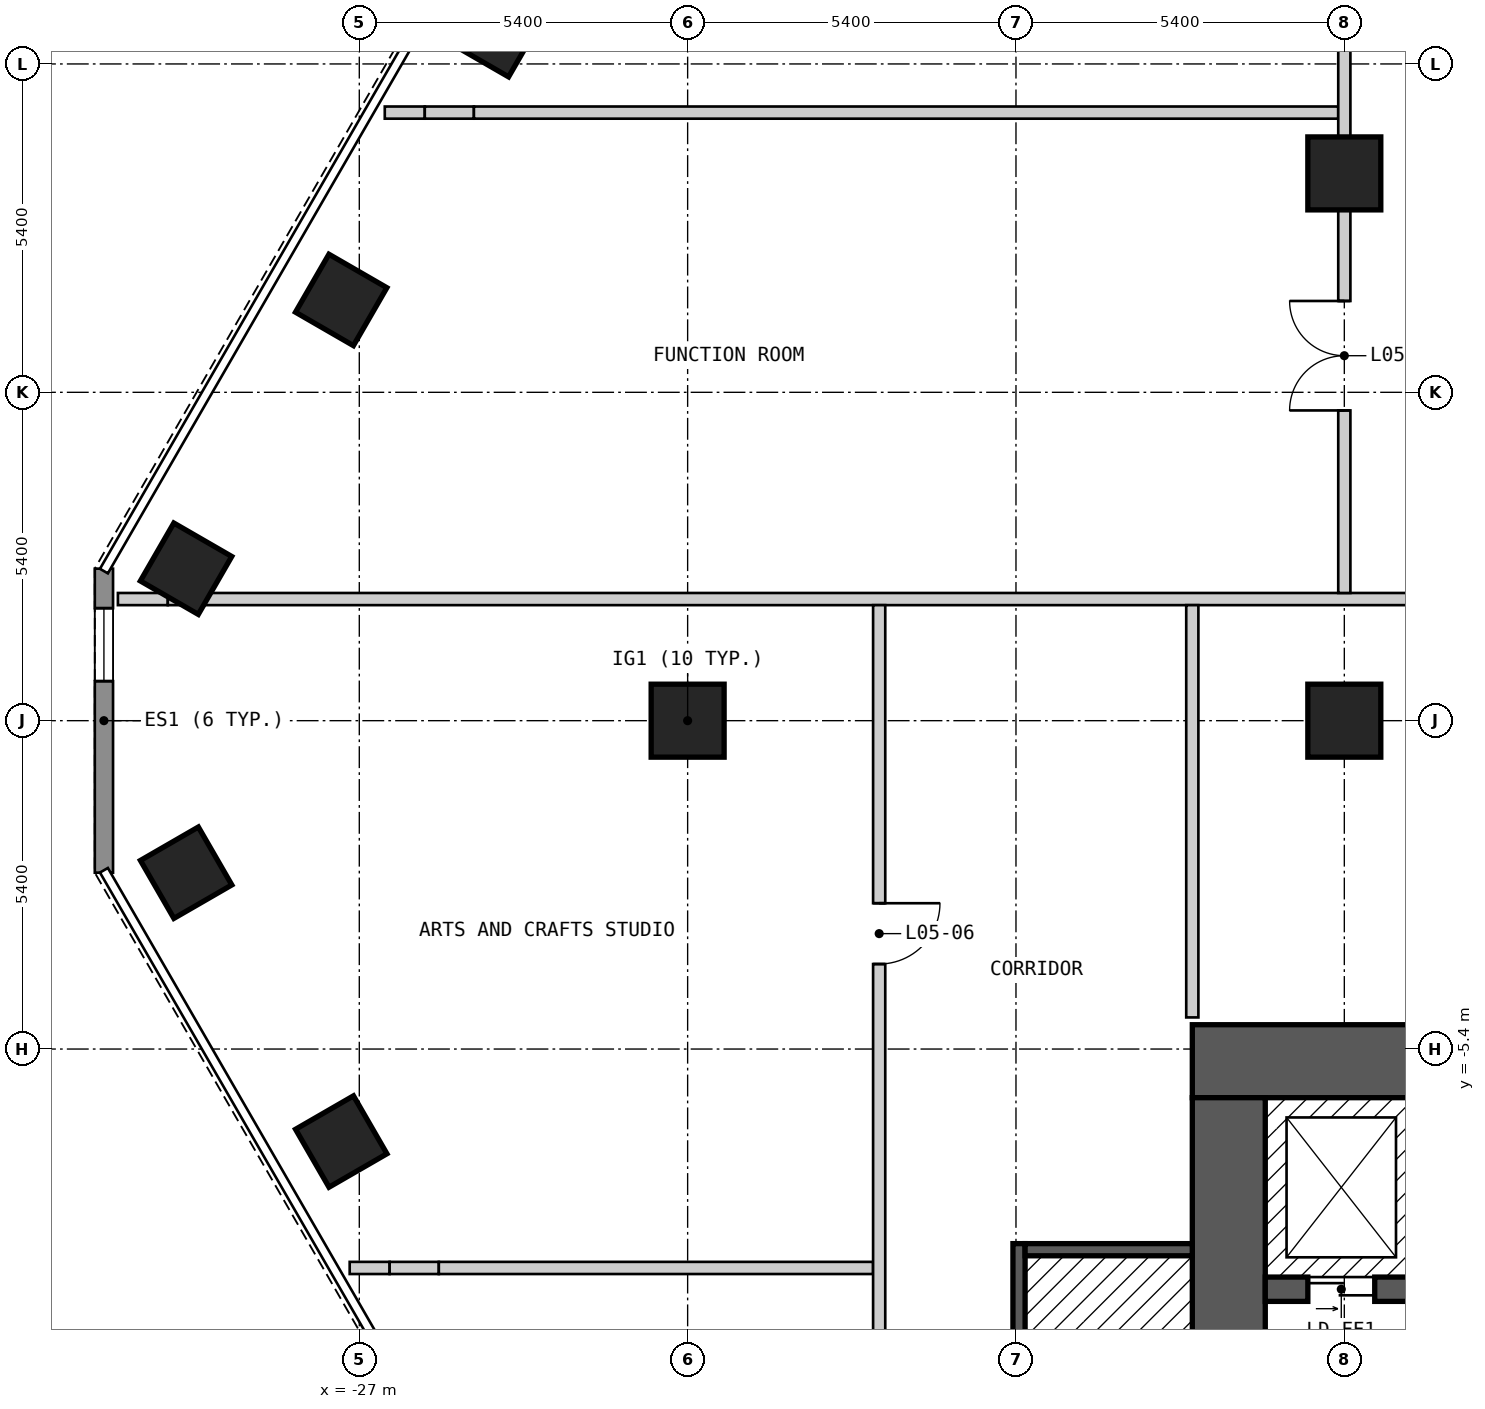
"""IFC4 building model, lengths in metres.
Left out: names, types, materials, properties, quantities, classifications, styles, units other than length and angle.
Written with IfcOpenShell. Run it as: python <this file> out.ifc"""

import sys

from ifc_helpers import new_model, si_unit, direction, frame, frame_2d, origin, origin_2d, place, context, subcontext, project, spatial, polyline, rectangle, outline, extrude, element, fill, save


model = new_model("IFC4")
c1 = context("Model", 3, precision=1e-05, world=origin(), true_north=direction((0.0, 1.0)))
c2 = subcontext(c1, "Body", "Model", "MODEL_VIEW")
j1 = project(units=[si_unit("LENGTHUNIT", "METRE"), si_unit("PLANEANGLEUNIT", "RADIAN")], contexts=[c1])
p1 = place(None, origin())
s1 = spatial("IfcSite", under=j1, at=p1, CompositionType="ELEMENT")
p2 = place(p1, origin())
s2 = spatial("IfcBuilding", under=s1, at=p2, CompositionType="ELEMENT")
p3 = place(p2, frame((0.0, 0.0, 19.8)))
s3 = spatial("IfcBuildingStorey", under=s2, at=p3, CompositionType="ELEMENT", Elevation=19.8)
for number, where, z_axis, x_axis in (
    (1, (-24.746, 11.339, 0.0), (0.0, 0.0, 1.0), (-0.5, -0.866, 0.0)),
    (2, (-27.298, 6.919, 0.0), (0.0, 0.0, 1.0), (-0.5, -0.866, 0.0)),
    (3, (-29.849, 2.499, 0.0), (0.0, 0.0, 1.0), (-0.5, -0.866, 0.0)),
    (4, (-29.848, -2.5, 0.0), (0.0, 0.0, 1.0), (0.5, -0.866, 0.0)),
    (5, (-27.297, -6.921, 0.0), (0.0, 0.0, 1.0), (0.5, -0.866, 0.0)),
):
    element("IfcColumn", number, at=place(p3, frame(where, z_axis=z_axis, x_axis=x_axis)), inside=s3, PredefinedType="COLUMN", context=c2, shape_type="SweptSolid", body=[
        extrude(rectangle(XDim=1.1, YDim=1.1, at=origin_2d()), origin(), (0.0, 0.0, 1.0), 3.6),
    ])
for number, where, z_axis, x_axis in (
    (6, (-21.6, 0.0, 0.0), (0.0, 0.0, 1.0), (1.0, 0.0, 0.0)),
    (7, (-10.8, 0.0, 0.0), (0.0, 0.0, 1.0), (1.0, 0.0, 0.0)),
    (8, (-10.8, 9.0, 0.0), (0.0, 0.0, 1.0), (1.0, 0.0, 0.0)),
):
    element("IfcColumn", number, at=place(p3, frame(where, z_axis=z_axis, x_axis=x_axis)), inside=s3, PredefinedType="COLUMN", context=c2, shape_type="SweptSolid", body=[
        extrude(rectangle(XDim=1.2, YDim=1.2, at=origin_2d()), origin(), (0.0, 0.0, 1.0), 3.6),
    ])
p4 = place(p3, frame((-13.3, -5.6, 0.0), z_axis=(0.0, 0.0, 1.0), x_axis=(1.0, 0.0, 0.0)))
e9 = element("IfcWall", 9, at=p4, inside=s3, PredefinedType="SHEAR", context=c2, shape_type="SweptSolid", body=[
    extrude(rectangle(XDim=26.6, YDim=1.2, at=frame_2d((13.3, 0.0))), origin(), (0.0, 0.0, 1.0), 2.8),
])
p5 = place(p4, frame((23.65, 0.0, 0.0)))
e10 = element("IfcOpeningElement", 10, at=p5, cuts=e9, PredefinedType="OPENING", context=c2, shape_type="SweptSolid", body=[
    extrude(rectangle(XDim=1.2, YDim=2.1, at=frame_2d((0.6, 1.05))), frame((0.0, 0.61, 0.0), z_axis=(0.0, -1.0, 0.0), x_axis=(1.0, 0.0, 0.0)), (0.0, 0.0, 1.0), 1.22),
])
p6 = place(p3, frame((-12.7, -17.8, 0.0), z_axis=(0.0, 0.0, 1.0), x_axis=(0.0, 1.0, 0.0)))
e11 = element("IfcWall", 11, at=p6, inside=s3, PredefinedType="SHEAR", context=c2, shape_type="SweptSolid", body=[
    extrude(rectangle(XDim=11.6, YDim=1.2, at=frame_2d((5.8, 0.0))), origin(), (0.0, 0.0, 1.0), 2.8),
])
p7 = place(p6, frame((3.6, 0.0, 0.0)))
e12 = element("IfcOpeningElement", 12, at=p7, cuts=e11, PredefinedType="OPENING", context=c2, shape_type="SweptSolid", body=[
    extrude(rectangle(XDim=1.2, YDim=2.1, at=frame_2d((0.6, 1.05))), frame((0.0, 0.61, 0.0), z_axis=(0.0, -1.0, 0.0), x_axis=(1.0, 0.0, 0.0)), (0.0, 0.0, 1.0), 1.22),
])
p8 = place(p3, frame((-12.1, -9.35, 0.0), z_axis=(0.0, 0.0, 1.0), x_axis=(1.0, 0.0, 0.0)))
e13 = element("IfcWall", 13, at=p8, inside=s3, PredefinedType="SHEAR", context=c2, shape_type="SweptSolid", body=[
    extrude(rectangle(XDim=22.3, YDim=0.4, at=frame_2d((11.15, 0.0))), origin(), (0.0, 0.0, 1.0), 2.8),
])
p9 = place(p8, frame((0.7, 0.0, 0.0)))
e14 = element("IfcOpeningElement", 14, at=p9, cuts=e13, PredefinedType="OPENING", context=c2, shape_type="SweptSolid", body=[
    extrude(rectangle(XDim=1.1, YDim=2.1, at=frame_2d((0.55, 1.05))), frame((0.0, 0.21, 0.0), z_axis=(0.0, -1.0, 0.0), x_axis=(1.0, 0.0, 0.0)), (0.0, 0.0, 1.0), 0.42),
])
p10 = place(p8, frame((3.5, 0.0, 0.0)))
e15 = element("IfcOpeningElement", 15, at=p10, cuts=e13, PredefinedType="OPENING", context=c2, shape_type="SweptSolid", body=[
    extrude(rectangle(XDim=1.1, YDim=2.1, at=frame_2d((0.55, 1.05))), frame((0.0, 0.21, 0.0), z_axis=(0.0, -1.0, 0.0), x_axis=(1.0, 0.0, 0.0)), (0.0, 0.0, 1.0), 0.42),
])
p11 = place(p8, frame((6.3, 0.0, 0.0)))
e16 = element("IfcOpeningElement", 16, at=p11, cuts=e13, PredefinedType="OPENING", context=c2, shape_type="SweptSolid", body=[
    extrude(rectangle(XDim=1.1, YDim=2.1, at=frame_2d((0.55, 1.05))), frame((0.0, 0.21, 0.0), z_axis=(0.0, -1.0, 0.0), x_axis=(1.0, 0.0, 0.0)), (0.0, 0.0, 1.0), 0.42),
])
p12 = place(p8, frame((8.6, 0.0, 0.0)))
e17 = element("IfcOpeningElement", 17, at=p12, cuts=e13, PredefinedType="OPENING", context=c2, shape_type="SweptSolid", body=[
    extrude(rectangle(XDim=1.1, YDim=2.1, at=frame_2d((0.55, 1.05))), frame((0.0, 0.21, 0.0), z_axis=(0.0, -1.0, 0.0), x_axis=(1.0, 0.0, 0.0)), (0.0, 0.0, 1.0), 0.42),
])
p13 = place(p8, frame((10.9, 0.0, 0.0)))
e18 = element("IfcOpeningElement", 18, at=p13, cuts=e13, PredefinedType="OPENING", context=c2, shape_type="SweptSolid", body=[
    extrude(rectangle(XDim=1.1, YDim=2.1, at=frame_2d((0.55, 1.05))), frame((0.0, 0.21, 0.0), z_axis=(0.0, -1.0, 0.0), x_axis=(1.0, 0.0, 0.0)), (0.0, 0.0, 1.0), 0.42),
])
p14 = place(p8, frame((13.2, 0.0, 0.0)))
e19 = element("IfcOpeningElement", 19, at=p14, cuts=e13, PredefinedType="OPENING", context=c2, shape_type="SweptSolid", body=[
    extrude(rectangle(XDim=1.1, YDim=2.1, at=frame_2d((0.55, 1.05))), frame((0.0, 0.21, 0.0), z_axis=(0.0, -1.0, 0.0), x_axis=(1.0, 0.0, 0.0)), (0.0, 0.0, 1.0), 0.42),
])
p15 = place(p8, frame((15.5, 0.0, 0.0)))
e20 = element("IfcOpeningElement", 20, at=p15, cuts=e13, PredefinedType="OPENING", context=c2, shape_type="SweptSolid", body=[
    extrude(rectangle(XDim=1.1, YDim=2.1, at=frame_2d((0.55, 1.05))), frame((0.0, 0.21, 0.0), z_axis=(0.0, -1.0, 0.0), x_axis=(1.0, 0.0, 0.0)), (0.0, 0.0, 1.0), 0.42),
])
p16 = place(p8, frame((17.8, 0.0, 0.0)))
e21 = element("IfcOpeningElement", 21, at=p16, cuts=e13, PredefinedType="OPENING", context=c2, shape_type="SweptSolid", body=[
    extrude(rectangle(XDim=1.1, YDim=2.1, at=frame_2d((0.55, 1.05))), frame((0.0, 0.21, 0.0), z_axis=(0.0, -1.0, 0.0), x_axis=(1.0, 0.0, 0.0)), (0.0, 0.0, 1.0), 0.42),
])
p17 = place(p8, frame((20.2, 0.0, 0.0)))
e22 = element("IfcOpeningElement", 22, at=p17, cuts=e13, PredefinedType="OPENING", context=c2, shape_type="SweptSolid", body=[
    extrude(rectangle(XDim=1.1, YDim=2.1, at=frame_2d((0.55, 1.05))), frame((0.0, 0.21, 0.0), z_axis=(0.0, -1.0, 0.0), x_axis=(1.0, 0.0, 0.0)), (0.0, 0.0, 1.0), 0.42),
])
p18 = place(p3, frame((-31.2, 2.5, 0.0), z_axis=(0.0, 0.0, 1.0), x_axis=(0.0, -1.0, 0.0)))
e23 = element("IfcWall", 23, at=p18, inside=s3, PredefinedType="SOLIDWALL", context=c2, shape_type="SweptSolid", body=[
    extrude(outline(polyline([(0.0, -0.15), (5.0, -0.15), (4.92, 0.15), (0.08, 0.15), (0.0, -0.15)])), origin(), (0.0, 0.0, 1.0), 2.8),
])
p19 = place(p18, frame((0.65, 0.0, 0.15)))
e24 = element("IfcOpeningElement", 24, at=p19, cuts=e23, PredefinedType="OPENING", context=c2, shape_type="SweptSolid", body=[
    extrude(rectangle(XDim=1.2, YDim=2.1, at=frame_2d((0.6, 1.05))), frame((0.0, 0.16, 0.0), z_axis=(0.0, -1.0, 0.0), x_axis=(1.0, 0.0, 0.0)), (0.0, 0.0, 1.0), 0.32),
])
p20 = place(p3, frame((-27.158, -9.0, 0.0), z_axis=(0.0, 0.0, 1.0), x_axis=(1.0, 0.0, 0.0)))
e25 = element("IfcWall", 25, at=p20, inside=s3, PredefinedType="PARTITIONING", context=c2, shape_type="SweptSolid", body=[
    extrude(rectangle(XDim=0.657, YDim=0.2, at=frame_2d((0.329, 0.0))), origin(), (0.0, 0.0, 1.0), 2.8),
])
p21 = place(p3, frame((-26.501, -9.0, 0.0), z_axis=(0.0, 0.0, 1.0), x_axis=(1.0, 0.0, 0.0)))
e26 = element("IfcWall", 26, at=p21, inside=s3, PredefinedType="PARTITIONING", context=c2, shape_type="SweptSolid", body=[
    extrude(rectangle(XDim=0.809, YDim=0.2, at=frame_2d((0.405, 0.0))), origin(), (0.0, 0.0, 1.0), 2.07),
])
p22 = place(p3, frame((-25.692, -9.0, 0.0), z_axis=(0.0, 0.0, 1.0), x_axis=(1.0, 0.0, 0.0)))
e27 = element("IfcWall", 27, at=p22, inside=s3, PredefinedType="PARTITIONING", context=c2, shape_type="SweptSolid", body=[
    extrude(rectangle(XDim=7.142, YDim=0.2, at=frame_2d((3.571, 0.0))), origin(), (0.0, 0.0, 1.0), 2.8),
])
p23 = place(p3, frame((-30.97, 2.0, 0.0), z_axis=(0.0, 0.0, 1.0), x_axis=(1.0, 0.0, 0.0)))
e28 = element("IfcWall", 28, at=p23, inside=s3, PredefinedType="PARTITIONING", context=c2, shape_type="SweptSolid", body=[
    extrude(rectangle(XDim=0.821, YDim=0.2, at=frame_2d((0.411, 0.0))), origin(), (0.0, 0.0, 1.0), 2.8),
])
p24 = place(p3, frame((-30.149, 2.0, 0.0), z_axis=(0.0, 0.0, 1.0), x_axis=(1.0, 0.0, 0.0)))
e29 = element("IfcWall", 29, at=p24, inside=s3, PredefinedType="PARTITIONING", context=c2, shape_type="SweptSolid", body=[
    extrude(rectangle(XDim=0.6, YDim=0.2, at=frame_2d((0.3, 0.0))), origin(), (0.0, 0.0, 1.0), 2.07),
])
p25 = place(p3, frame((-29.549, 2.0, 0.0), z_axis=(0.0, 0.0, 1.0), x_axis=(1.0, 0.0, 0.0)))
e30 = element("IfcWall", 30, at=p25, inside=s3, PredefinedType="PARTITIONING", context=c2, shape_type="SweptSolid", body=[
    extrude(rectangle(XDim=59.097, YDim=0.2, at=frame_2d((29.549, 0.0))), origin(), (0.0, 0.0, 1.0), 2.8),
])
p26 = place(p25, frame((21.517, 0.0, 0.0)))
e31 = element("IfcOpeningElement", 31, at=p26, cuts=e30, PredefinedType="OPENING", context=c2, shape_type="SweptSolid", body=[
    extrude(rectangle(XDim=1.8, YDim=2.1, at=frame_2d((0.9, 1.05))), frame((0.0, 0.11, 0.0), z_axis=(0.0, -1.0, 0.0), x_axis=(1.0, 0.0, 0.0)), (0.0, 0.0, 1.0), 0.22),
])
p27 = place(p25, frame((35.781, 0.0, 0.0)))
e32 = element("IfcOpeningElement", 32, at=p27, cuts=e30, PredefinedType="OPENING", context=c2, shape_type="SweptSolid", body=[
    extrude(rectangle(XDim=1.8, YDim=2.1, at=frame_2d((0.9, 1.05))), frame((0.0, 0.11, 0.0), z_axis=(0.0, -1.0, 0.0), x_axis=(1.0, 0.0, 0.0)), (0.0, 0.0, 1.0), 0.22),
])
p28 = place(p3, frame((-26.581, 10.0, 0.0), z_axis=(0.0, 0.0, 1.0), x_axis=(1.0, 0.0, 0.0)))
e33 = element("IfcWall", 33, at=p28, inside=s3, PredefinedType="PARTITIONING", context=c2, shape_type="SweptSolid", body=[
    extrude(rectangle(XDim=0.658, YDim=0.2, at=frame_2d((0.329, 0.0))), origin(), (0.0, 0.0, 1.0), 2.8),
])
p29 = place(p3, frame((-25.923, 10.0, 0.0), z_axis=(0.0, 0.0, 1.0), x_axis=(1.0, 0.0, 0.0)))
e34 = element("IfcWall", 34, at=p29, inside=s3, PredefinedType="PARTITIONING", context=c2, shape_type="SweptSolid", body=[
    extrude(rectangle(XDim=0.808, YDim=0.2, at=frame_2d((0.404, 0.0))), origin(), (0.0, 0.0, 1.0), 2.07),
])
p30 = place(p3, frame((-25.115, 10.0, 0.0), z_axis=(0.0, 0.0, 1.0), x_axis=(1.0, 0.0, 0.0)))
e35 = element("IfcWall", 35, at=p30, inside=s3, PredefinedType="PARTITIONING", context=c2, shape_type="SweptSolid", body=[
    extrude(rectangle(XDim=14.215, YDim=0.2, at=frame_2d((7.107, 0.0))), origin(), (0.0, 0.0, 1.0), 2.8),
])
p31 = place(p3, frame((-18.45, -21.471, 0.0), z_axis=(0.0, 0.0, 1.0), x_axis=(0.0, 1.0, 0.0)))
e36 = element("IfcWall", 36, at=p31, inside=s3, PredefinedType="PARTITIONING", context=c2, shape_type="SweptSolid", body=[
    extrude(rectangle(XDim=23.371, YDim=0.2, at=frame_2d((11.686, 0.0))), origin(), (0.0, 0.0, 1.0), 2.8),
])
p32 = place(p31, frame((5.873, 0.0, 0.0)))
e37 = element("IfcOpeningElement", 37, at=p32, cuts=e36, PredefinedType="OPENING", context=c2, shape_type="SweptSolid", body=[
    extrude(rectangle(XDim=1.0, YDim=2.1, at=frame_2d((0.5, 1.05))), frame((0.0, 0.11, 0.0), z_axis=(0.0, -1.0, 0.0), x_axis=(1.0, 0.0, 0.0)), (0.0, 0.0, 1.0), 0.22),
])
p33 = place(p31, frame((17.469, 0.0, 0.0)))
e38 = element("IfcOpeningElement", 38, at=p33, cuts=e36, PredefinedType="OPENING", context=c2, shape_type="SweptSolid", body=[
    extrude(rectangle(XDim=1.0, YDim=2.1, at=frame_2d((0.5, 1.05))), frame((0.0, 0.11, 0.0), z_axis=(0.0, -1.0, 0.0), x_axis=(1.0, 0.0, 0.0)), (0.0, 0.0, 1.0), 0.22),
])
p34 = place(p3, frame((-13.3, -4.88, 0.0), z_axis=(0.0, 0.0, 1.0), x_axis=(0.0, 1.0, 0.0)))
e39 = element("IfcWall", 39, at=p34, inside=s3, PredefinedType="PARTITIONING", context=c2, shape_type="SweptSolid", body=[
    extrude(rectangle(XDim=6.78, YDim=0.2, at=frame_2d((3.39, 0.0))), origin(), (0.0, 0.0, 1.0), 2.8),
])
p35 = place(p3, frame((-10.8, 2.1, 0.0), z_axis=(0.0, 0.0, 1.0), x_axis=(0.0, 1.0, 0.0)))
e40 = element("IfcWall", 40, at=p35, inside=s3, PredefinedType="PARTITIONING", context=c2, shape_type="SweptSolid", body=[
    extrude(rectangle(XDim=24.7, YDim=0.2, at=frame_2d((12.35, 0.0))), origin(), (0.0, 0.0, 1.0), 2.8),
])
p36 = place(p35, frame((3.002, 0.0, 0.0)))
e41 = element("IfcOpeningElement", 41, at=p36, cuts=e40, PredefinedType="OPENING", context=c2, shape_type="SweptSolid", body=[
    extrude(rectangle(XDim=1.8, YDim=2.1, at=frame_2d((0.9, 1.05))), frame((0.0, 0.11, 0.0), z_axis=(0.0, -1.0, 0.0), x_axis=(1.0, 0.0, 0.0)), (0.0, 0.0, 1.0), 0.22),
])
p37 = place(p35, frame((11.398, 0.0, 0.0)))
e42 = element("IfcOpeningElement", 42, at=p37, cuts=e40, PredefinedType="OPENING", context=c2, shape_type="SweptSolid", body=[
    extrude(rectangle(XDim=1.0, YDim=2.1, at=frame_2d((0.5, 1.05))), frame((0.0, 0.11, 0.0), z_axis=(0.0, -1.0, 0.0), x_axis=(1.0, 0.0, 0.0)), (0.0, 0.0, 1.0), 0.22),
])
p38 = place(p3, frame((-16.15, -14.4, 0.0), z_axis=(0.0, 0.0, 1.0), x_axis=(0.0, 1.0, 0.0)))
e43 = element("IfcWall", 43, at=p38, inside=s3, PredefinedType="SOLIDWALL", context=c2, shape_type="SweptSolid", body=[
    extrude(rectangle(XDim=5.8, YDim=0.2, at=frame_2d((2.9, 0.0))), origin(), (0.0, 0.0, 1.0), 2.8),
])
p39 = place(p3, frame((-16.05, -8.7, 0.0), z_axis=(0.0, 0.0, 1.0), x_axis=(1.0, 0.0, 0.0)))
e44 = element("IfcWall", 44, at=p39, inside=s3, PredefinedType="SOLIDWALL", context=c2, shape_type="SweptSolid", body=[
    extrude(rectangle(XDim=2.75, YDim=0.2, at=frame_2d((1.375, 0.0))), origin(), (0.0, 0.0, 1.0), 2.8),
])
p40 = place(p19, origin())
e45 = element("IfcWindow", 45, at=p40, inside=s3, PartitioningType="SINGLE_PANEL", PredefinedType="WINDOW", context=c2, shape_type="SweptSolid", body=[
    extrude(rectangle(XDim=1.2, YDim=2.1, at=frame_2d((0.6, 1.05))), frame((0.0, 0.03, 0.0), z_axis=(0.0, -1.0, 0.0), x_axis=(1.0, 0.0, 0.0)), (0.0, 0.0, 1.0), 0.06),
])
fill(e24, e45)
p41 = place(p33, origin())
e46 = element("IfcDoor", 46, at=p41, inside=s3, OperationType="SINGLE_SWING_RIGHT", PredefinedType="DOOR", context=c2, shape_type="SweptSolid", body=[
    extrude(rectangle(XDim=1.0, YDim=2.1, at=frame_2d((0.5, 1.05))), frame((0.0, 0.025, 0.0), z_axis=(0.0, -1.0, 0.0), x_axis=(1.0, 0.0, 0.0)), (0.0, 0.0, 1.0), 0.05),
])
fill(e38, e46)
p42 = place(p36, origin())
e47 = element("IfcDoor", 47, at=p42, inside=s3, OperationType="DOUBLE_DOOR_SINGLE_SWING", PredefinedType="DOOR", context=c2, shape_type="SweptSolid", body=[
    extrude(rectangle(XDim=1.8, YDim=2.1, at=frame_2d((0.9, 1.05))), frame((0.0, 0.025, 0.0), z_axis=(0.0, -1.0, 0.0), x_axis=(1.0, 0.0, 0.0)), (0.0, 0.0, 1.0), 0.05),
])
fill(e41, e47)
p43 = place(p9, origin())
e48 = element("IfcDoor", 48, at=p43, inside=s3, OperationType="DOUBLE_DOOR_SLIDING", PredefinedType="DOOR", context=c2, shape_type="SweptSolid", body=[
    extrude(rectangle(XDim=1.1, YDim=2.1, at=frame_2d((0.55, 1.05))), frame((0.0, 0.025, 0.0), z_axis=(0.0, -1.0, 0.0), x_axis=(1.0, 0.0, 0.0)), (0.0, 0.0, 1.0), 0.05),
])
fill(e14, e48)
save(model, sys.argv[1])
